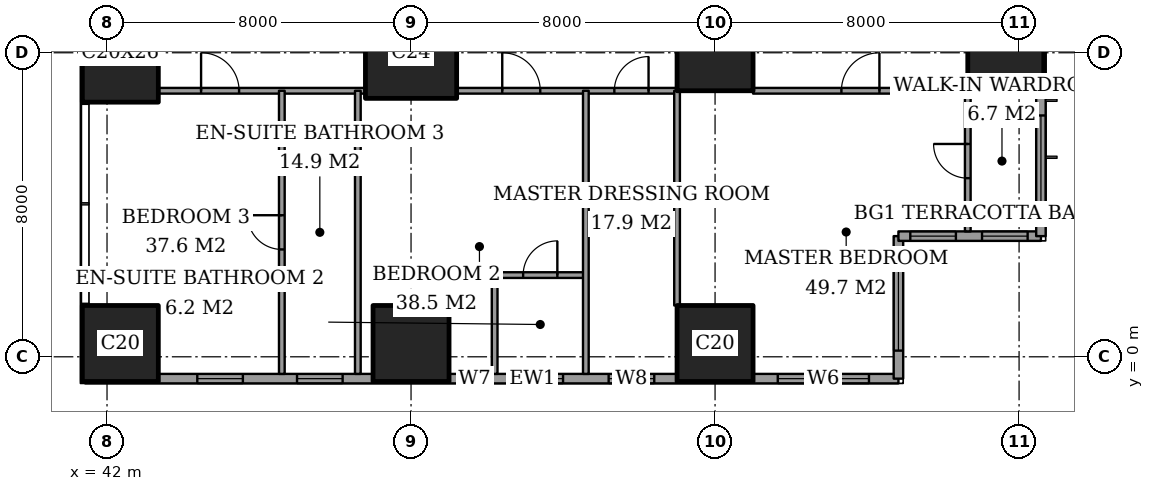
"""IFC4 building model, lengths in metres.
Left out: names, types, materials, properties, quantities, classifications, styles, units other than length and angle.
Written with IfcOpenShell. Run it as: python <this file> out.ifc"""

import sys

from ifc_helpers import new_model, si_unit, direction, frame, frame_2d, origin, origin_2d, place, context, subcontext, project, spatial, rectangle, extrude, element, fill, save


model = new_model("IFC4")
c1 = context("Model", 3, precision=1e-05, world=origin(), true_north=direction((0.0, 1.0)))
c2 = subcontext(c1, "Body", "Model", "MODEL_VIEW")
j1 = project(units=[si_unit("LENGTHUNIT", "METRE"), si_unit("PLANEANGLEUNIT", "RADIAN")], contexts=[c1])
p1 = place(None, origin())
s1 = spatial("IfcSite", under=j1, at=p1, CompositionType="ELEMENT")
p2 = place(p1, origin())
s2 = spatial("IfcBuilding", under=s1, at=p2, CompositionType="ELEMENT")
p3 = place(p2, frame((0.0, 0.0, 76.4)))
s3 = spatial("IfcBuildingStorey", under=s2, at=p3, CompositionType="ELEMENT", Elevation=76.4)
p4 = place(p3, frame((42.35, 0.35, 0.0), z_axis=(0.0, 0.0, 1.0), x_axis=(1.0, 0.0, 0.0)))
e1 = element("IfcColumn", 1, at=p4, inside=s3, PredefinedType="COLUMN", context=c2, shape_type="SweptSolid", body=[
    extrude(rectangle(XDim=2.0, YDim=2.0, at=origin_2d()), origin(), (0.0, 0.0, 1.0), 3.6),
])
p5 = place(p3, frame((42.35, 8.0, 0.0), z_axis=(0.0, 0.0, 1.0), x_axis=(1.0, 0.0, 0.0)))
e2 = element("IfcColumn", 2, at=p5, inside=s3, PredefinedType="COLUMN", context=c2, shape_type="SweptSolid", body=[
    extrude(rectangle(XDim=2.0, YDim=2.6, at=origin_2d()), origin(), (0.0, 0.0, 1.0), 3.6),
])
p6 = place(p3, frame((50.0, 0.35, 0.0), z_axis=(0.0, 0.0, 1.0), x_axis=(1.0, 0.0, 0.0)))
e3 = element("IfcColumn", 3, at=p6, inside=s3, PredefinedType="COLUMN", context=c2, shape_type="SweptSolid", body=[
    extrude(rectangle(XDim=2.0, YDim=2.0, at=origin_2d()), origin(), (0.0, 0.0, 1.0), 3.6),
])
p7 = place(p3, frame((50.0, 8.0, 0.0), z_axis=(0.0, 0.0, 1.0), x_axis=(1.0, 0.0, 0.0)))
e4 = element("IfcColumn", 4, at=p7, inside=s3, PredefinedType="COLUMN", context=c2, shape_type="SweptSolid", body=[
    extrude(rectangle(XDim=2.4, YDim=2.4, at=origin_2d()), origin(), (0.0, 0.0, 1.0), 3.6),
])
for number, where, z_axis, x_axis in (
    (5, (58.0, 0.35, 0.0), (0.0, 0.0, 1.0), (1.0, 0.0, 0.0)),
    (6, (58.0, 8.0, 0.0), (0.0, 0.0, 1.0), (1.0, 0.0, 0.0)),
    (7, (65.65, 8.0, 0.0), (0.0, 0.0, 1.0), (1.0, 0.0, 0.0)),
):
    element("IfcColumn", number, at=place(p3, frame(where, z_axis=z_axis, x_axis=x_axis)), inside=s3, PredefinedType="COLUMN", context=c2, shape_type="SweptSolid", body=[
        extrude(rectangle(XDim=2.0, YDim=2.0, at=origin_2d()), origin(), (0.0, 0.0, 1.0), 3.6),
    ])
p8 = place(p3, frame((41.425, -0.575, 0.0), z_axis=(0.0, 0.0, 1.0), x_axis=(1.0, 0.0, 0.0)))
e8 = element("IfcWall", 8, at=p8, inside=s3, PredefinedType="SOLIDWALL", context=c2, shape_type="SweptSolid", body=[
    extrude(rectangle(XDim=21.4, YDim=0.25, at=frame_2d((10.7, 0.0))), origin(), (0.0, 0.0, 1.0), 3.6),
])
p9 = place(p8, frame((2.95, 0.0, 0.6)))
e9 = element("IfcOpeningElement", 9, at=p9, cuts=e8, PredefinedType="OPENING", context=c2, shape_type="SweptSolid", body=[
    extrude(rectangle(XDim=1.2, YDim=2.0, at=frame_2d((0.6, 1.0))), frame((0.0, 0.135, 0.0), z_axis=(0.0, -1.0, 0.0), x_axis=(1.0, 0.0, 0.0)), (0.0, 0.0, 1.0), 0.27),
])
p10 = place(p8, frame((5.575, 0.0, 0.6)))
e10 = element("IfcOpeningElement", 10, at=p10, cuts=e8, PredefinedType="OPENING", context=c2, shape_type="SweptSolid", body=[
    extrude(rectangle(XDim=1.2, YDim=2.0, at=frame_2d((0.6, 1.0))), frame((0.0, 0.135, 0.0), z_axis=(0.0, -1.0, 0.0), x_axis=(1.0, 0.0, 0.0)), (0.0, 0.0, 1.0), 0.27),
])
p11 = place(p8, frame((9.95, 0.0, 0.6)))
e11 = element("IfcOpeningElement", 11, at=p11, cuts=e8, PredefinedType="OPENING", context=c2, shape_type="SweptSolid", body=[
    extrude(rectangle(XDim=0.6, YDim=2.0, at=frame_2d((0.3, 1.0))), frame((0.0, 0.135, 0.0), z_axis=(0.0, -1.0, 0.0), x_axis=(1.0, 0.0, 0.0)), (0.0, 0.0, 1.0), 0.27),
])
p12 = place(p8, frame((11.375, 0.0, 0.6)))
e12 = element("IfcOpeningElement", 12, at=p12, cuts=e8, PredefinedType="OPENING", context=c2, shape_type="SweptSolid", body=[
    extrude(rectangle(XDim=1.2, YDim=2.0, at=frame_2d((0.6, 1.0))), frame((0.0, 0.135, 0.0), z_axis=(0.0, -1.0, 0.0), x_axis=(1.0, 0.0, 0.0)), (0.0, 0.0, 1.0), 0.27),
])
p13 = place(p8, frame((13.775, 0.0, 0.6)))
e13 = element("IfcOpeningElement", 13, at=p13, cuts=e8, PredefinedType="OPENING", context=c2, shape_type="SweptSolid", body=[
    extrude(rectangle(XDim=1.2, YDim=2.0, at=frame_2d((0.6, 1.0))), frame((0.0, 0.135, 0.0), z_axis=(0.0, -1.0, 0.0), x_axis=(1.0, 0.0, 0.0)), (0.0, 0.0, 1.0), 0.27),
])
p14 = place(p8, frame((18.225, 0.0, 0.6)))
e14 = element("IfcOpeningElement", 14, at=p14, cuts=e8, PredefinedType="OPENING", context=c2, shape_type="SweptSolid", body=[
    extrude(rectangle(XDim=2.4, YDim=2.0, at=frame_2d((1.2, 1.0))), frame((0.0, 0.135, 0.0), z_axis=(0.0, -1.0, 0.0), x_axis=(1.0, 0.0, 0.0)), (0.0, 0.0, 1.0), 0.27),
])
p15 = place(p3, frame((62.825, -0.575, 0.0), z_axis=(0.0, 0.0, 1.0), x_axis=(0.0, 1.0, 0.0)))
e15 = element("IfcWall", 15, at=p15, inside=s3, PredefinedType="SOLIDWALL", context=c2, shape_type="SweptSolid", body=[
    extrude(rectangle(XDim=3.75, YDim=0.25, at=frame_2d((1.875, 0.0))), origin(), (0.0, 0.0, 1.0), 3.6),
])
p16 = place(p15, frame((0.738, 0.0, 0.6)))
e16 = element("IfcOpeningElement", 16, at=p16, cuts=e15, PredefinedType="OPENING", context=c2, shape_type="SweptSolid", body=[
    extrude(rectangle(XDim=2.4, YDim=2.0, at=frame_2d((1.2, 1.0))), frame((0.0, 0.135, 0.0), z_axis=(0.0, -1.0, 0.0), x_axis=(1.0, 0.0, 0.0)), (0.0, 0.0, 1.0), 0.27),
])
p17 = place(p3, frame((62.825, 3.175, 0.0), z_axis=(0.0, 0.0, 1.0), x_axis=(1.0, 0.0, 0.0)))
e17 = element("IfcWall", 17, at=p17, inside=s3, PredefinedType="SOLIDWALL", context=c2, shape_type="SweptSolid", body=[
    extrude(rectangle(XDim=3.75, YDim=0.25, at=frame_2d((1.875, 0.0))), origin(), (0.0, 0.0, 1.0), 3.6),
])
p18 = place(p17, frame((0.312, 0.0, 0.6)))
e18 = element("IfcOpeningElement", 18, at=p18, cuts=e17, PredefinedType="OPENING", context=c2, shape_type="SweptSolid", body=[
    extrude(rectangle(XDim=1.2, YDim=2.0, at=frame_2d((0.6, 1.0))), frame((0.0, 0.135, 0.0), z_axis=(0.0, -1.0, 0.0), x_axis=(1.0, 0.0, 0.0)), (0.0, 0.0, 1.0), 0.27),
])
p19 = place(p17, frame((2.2, 0.0, 0.6)))
e19 = element("IfcOpeningElement", 19, at=p19, cuts=e17, PredefinedType="OPENING", context=c2, shape_type="SweptSolid", body=[
    extrude(rectangle(XDim=1.2, YDim=2.0, at=frame_2d((0.6, 1.0))), frame((0.0, 0.135, 0.0), z_axis=(0.0, -1.0, 0.0), x_axis=(1.0, 0.0, 0.0)), (0.0, 0.0, 1.0), 0.27),
])
p20 = place(p3, frame((66.575, 3.175, 0.0), z_axis=(0.0, 0.0, 1.0), x_axis=(0.0, 1.0, 0.0)))
e20 = element("IfcWall", 20, at=p20, inside=s3, PredefinedType="SOLIDWALL", context=c2, shape_type="SweptSolid", body=[
    extrude(rectangle(XDim=41.65, YDim=0.25, at=frame_2d((20.825, 0.0))), origin(), (0.0, 0.0, 1.0), 3.6),
])
p21 = place(p20, frame((0.775, 0.0, 0.6)))
e21 = element("IfcOpeningElement", 21, at=p21, cuts=e20, PredefinedType="OPENING", context=c2, shape_type="SweptSolid", body=[
    extrude(rectangle(XDim=2.4, YDim=2.0, at=frame_2d((1.2, 1.0))), frame((0.0, 0.135, 0.0), z_axis=(0.0, -1.0, 0.0), x_axis=(1.0, 0.0, 0.0)), (0.0, 0.0, 1.0), 0.27),
])
p22 = place(p20, frame((6.1, 0.0, 0.6)))
e22 = element("IfcOpeningElement", 22, at=p22, cuts=e20, PredefinedType="OPENING", context=c2, shape_type="SweptSolid", body=[
    extrude(rectangle(XDim=1.2, YDim=2.0, at=frame_2d((0.6, 1.0))), frame((0.0, 0.135, 0.0), z_axis=(0.0, -1.0, 0.0), x_axis=(1.0, 0.0, 0.0)), (0.0, 0.0, 1.0), 0.27),
])
p23 = place(p20, frame((8.275, 0.0, 0.6)))
e23 = element("IfcOpeningElement", 23, at=p23, cuts=e20, PredefinedType="OPENING", context=c2, shape_type="SweptSolid", body=[
    extrude(rectangle(XDim=2.4, YDim=2.0, at=frame_2d((1.2, 1.0))), frame((0.0, 0.135, 0.0), z_axis=(0.0, -1.0, 0.0), x_axis=(1.0, 0.0, 0.0)), (0.0, 0.0, 1.0), 0.27),
])
p24 = place(p20, frame((15.775, 0.0, 0.6)))
e24 = element("IfcOpeningElement", 24, at=p24, cuts=e20, PredefinedType="OPENING", context=c2, shape_type="SweptSolid", body=[
    extrude(rectangle(XDim=2.4, YDim=2.0, at=frame_2d((1.2, 1.0))), frame((0.0, 0.135, 0.0), z_axis=(0.0, -1.0, 0.0), x_axis=(1.0, 0.0, 0.0)), (0.0, 0.0, 1.0), 0.27),
])
p25 = place(p20, frame((23.475, 0.0, 0.6)))
e25 = element("IfcOpeningElement", 25, at=p25, cuts=e20, PredefinedType="OPENING", context=c2, shape_type="SweptSolid", body=[
    extrude(rectangle(XDim=2.4, YDim=2.0, at=frame_2d((1.2, 1.0))), frame((0.0, 0.135, 0.0), z_axis=(0.0, -1.0, 0.0), x_axis=(1.0, 0.0, 0.0)), (0.0, 0.0, 1.0), 0.27),
])
p26 = place(p20, frame((30.975, 0.0, 0.6)))
e26 = element("IfcOpeningElement", 26, at=p26, cuts=e20, PredefinedType="OPENING", context=c2, shape_type="SweptSolid", body=[
    extrude(rectangle(XDim=2.4, YDim=2.0, at=frame_2d((1.2, 1.0))), frame((0.0, 0.135, 0.0), z_axis=(0.0, -1.0, 0.0), x_axis=(1.0, 0.0, 0.0)), (0.0, 0.0, 1.0), 0.27),
])
p27 = place(p20, frame((34.5, 0.0, 0.6)))
e27 = element("IfcOpeningElement", 27, at=p27, cuts=e20, PredefinedType="OPENING", context=c2, shape_type="SweptSolid", body=[
    extrude(rectangle(XDim=1.2, YDim=2.0, at=frame_2d((0.6, 1.0))), frame((0.0, 0.135, 0.0), z_axis=(0.0, -1.0, 0.0), x_axis=(1.0, 0.0, 0.0)), (0.0, 0.0, 1.0), 0.27),
])
p28 = place(p20, frame((38.475, 0.0, 0.6)))
e28 = element("IfcOpeningElement", 28, at=p28, cuts=e20, PredefinedType="OPENING", context=c2, shape_type="SweptSolid", body=[
    extrude(rectangle(XDim=2.4, YDim=2.0, at=frame_2d((1.2, 1.0))), frame((0.0, 0.135, 0.0), z_axis=(0.0, -1.0, 0.0), x_axis=(1.0, 0.0, 0.0)), (0.0, 0.0, 1.0), 0.27),
])
p29 = place(p3, frame((52.2, 2.15, 0.0), z_axis=(0.0, 0.0, 1.0), x_axis=(1.0, 0.0, 0.0)))
e29 = element("IfcWall", 29, at=p29, inside=s3, PredefinedType="PARTITIONING", context=c2, shape_type="SweptSolid", body=[
    extrude(rectangle(XDim=2.4, YDim=0.15, at=frame_2d((1.2, 0.0))), origin(), (0.0, 0.0, 1.0), 3.35),
])
p30 = place(p29, frame((0.75, 0.0, 0.0)))
e30 = element("IfcOpeningElement", 30, at=p30, cuts=e29, PredefinedType="OPENING", context=c2, shape_type="SweptSolid", body=[
    extrude(rectangle(XDim=0.9, YDim=2.1, at=frame_2d((0.45, 1.05))), frame((0.0, 0.085, 0.0), z_axis=(0.0, -1.0, 0.0), x_axis=(1.0, 0.0, 0.0)), (0.0, 0.0, 1.0), 0.17),
])
p31 = place(p3, frame((43.35, 7.0, 0.0), z_axis=(0.0, 0.0, 1.0), x_axis=(1.0, 0.0, 0.0)))
e31 = element("IfcWall", 31, at=p31, inside=s3, PredefinedType="PARTITIONING", context=c2, shape_type="SweptSolid", body=[
    extrude(rectangle(XDim=5.45, YDim=0.15, at=frame_2d((2.725, 0.0))), origin(), (0.0, 0.0, 1.0), 3.35),
])
p32 = place(p31, frame((1.125, 0.0, 0.0)))
e32 = element("IfcOpeningElement", 32, at=p32, cuts=e31, PredefinedType="OPENING", context=c2, shape_type="SweptSolid", body=[
    extrude(rectangle(XDim=1.0, YDim=2.1, at=frame_2d((0.5, 1.05))), frame((0.0, 0.085, 0.0), z_axis=(0.0, -1.0, 0.0), x_axis=(1.0, 0.0, 0.0)), (0.0, 0.0, 1.0), 0.17),
])
p33 = place(p3, frame((51.2, 7.0, 0.0), z_axis=(0.0, 0.0, 1.0), x_axis=(1.0, 0.0, 0.0)))
e33 = element("IfcWall", 33, at=p33, inside=s3, PredefinedType="PARTITIONING", context=c2, shape_type="SweptSolid", body=[
    extrude(rectangle(XDim=5.8, YDim=0.15, at=frame_2d((2.9, 0.0))), origin(), (0.0, 0.0, 1.0), 3.35),
])
p34 = place(p33, frame((4.15, 0.0, 0.0)))
e34 = element("IfcOpeningElement", 34, at=p34, cuts=e33, PredefinedType="OPENING", context=c2, shape_type="SweptSolid", body=[
    extrude(rectangle(XDim=0.9, YDim=2.1, at=frame_2d((0.45, 1.05))), frame((0.0, 0.085, 0.0), z_axis=(0.0, -1.0, 0.0), x_axis=(1.0, 0.0, 0.0)), (0.0, 0.0, 1.0), 0.17),
])
p35 = place(p33, frame((1.2, 0.0, 0.0)))
e35 = element("IfcOpeningElement", 35, at=p35, cuts=e33, PredefinedType="OPENING", context=c2, shape_type="SweptSolid", body=[
    extrude(rectangle(XDim=1.0, YDim=2.1, at=frame_2d((0.5, 1.05))), frame((0.0, 0.085, 0.0), z_axis=(0.0, -1.0, 0.0), x_axis=(1.0, 0.0, 0.0)), (0.0, 0.0, 1.0), 0.17),
])
p36 = place(p3, frame((59.0, 7.0, 0.0), z_axis=(0.0, 0.0, 1.0), x_axis=(1.0, 0.0, 0.0)))
e36 = element("IfcWall", 36, at=p36, inside=s3, PredefinedType="PARTITIONING", context=c2, shape_type="SweptSolid", body=[
    extrude(rectangle(XDim=5.65, YDim=0.15, at=frame_2d((2.825, 0.0))), origin(), (0.0, 0.0, 1.0), 3.35),
])
p37 = place(p36, frame((2.325, 0.0, 0.0)))
e37 = element("IfcOpeningElement", 37, at=p37, cuts=e36, PredefinedType="OPENING", context=c2, shape_type="SweptSolid", body=[
    extrude(rectangle(XDim=1.0, YDim=2.1, at=frame_2d((0.5, 1.05))), frame((0.0, 0.085, 0.0), z_axis=(0.0, -1.0, 0.0), x_axis=(1.0, 0.0, 0.0)), (0.0, 0.0, 1.0), 0.17),
])
p38 = place(p3, frame((46.6, -0.45, 0.0), z_axis=(0.0, 0.0, 1.0), x_axis=(0.0, 1.0, 0.0)))
e38 = element("IfcWall", 38, at=p38, inside=s3, PredefinedType="PARTITIONING", context=c2, shape_type="SweptSolid", body=[
    extrude(rectangle(XDim=7.45, YDim=0.15, at=frame_2d((3.725, 0.0))), origin(), (0.0, 0.0, 1.0), 3.35),
])
p39 = place(p38, frame((3.275, 0.0, 0.0)))
e39 = element("IfcOpeningElement", 39, at=p39, cuts=e38, PredefinedType="OPENING", context=c2, shape_type="SweptSolid", body=[
    extrude(rectangle(XDim=0.9, YDim=2.1, at=frame_2d((0.45, 1.05))), frame((0.0, 0.085, 0.0), z_axis=(0.0, -1.0, 0.0), x_axis=(1.0, 0.0, 0.0)), (0.0, 0.0, 1.0), 0.17),
])
p40 = place(p3, frame((48.6, -0.45, 0.0), z_axis=(0.0, 0.0, 1.0), x_axis=(0.0, 1.0, 0.0)))
e40 = element("IfcWall", 40, at=p40, inside=s3, PredefinedType="PARTITIONING", context=c2, shape_type="SweptSolid", body=[
    extrude(rectangle(XDim=7.45, YDim=0.15, at=frame_2d((3.725, 0.0))), origin(), (0.0, 0.0, 1.0), 3.35),
])
p41 = place(p3, frame((52.2, -0.45, 0.0), z_axis=(0.0, 0.0, 1.0), x_axis=(0.0, 1.0, 0.0)))
e41 = element("IfcWall", 41, at=p41, inside=s3, PredefinedType="PARTITIONING", context=c2, shape_type="SweptSolid", body=[
    extrude(rectangle(XDim=2.6, YDim=0.15, at=frame_2d((1.3, 0.0))), origin(), (0.0, 0.0, 1.0), 3.35),
])
p42 = place(p3, frame((54.6, -0.45, 0.0), z_axis=(0.0, 0.0, 1.0), x_axis=(0.0, 1.0, 0.0)))
e42 = element("IfcWall", 42, at=p42, inside=s3, PredefinedType="PARTITIONING", context=c2, shape_type="SweptSolid", body=[
    extrude(rectangle(XDim=7.45, YDim=0.15, at=frame_2d((3.725, 0.0))), origin(), (0.0, 0.0, 1.0), 3.35),
])
p43 = place(p3, frame((57.0, 1.35, 0.0), z_axis=(0.0, 0.0, 1.0), x_axis=(0.0, 1.0, 0.0)))
e43 = element("IfcWall", 43, at=p43, inside=s3, PredefinedType="PARTITIONING", context=c2, shape_type="SweptSolid", body=[
    extrude(rectangle(XDim=5.65, YDim=0.15, at=frame_2d((2.825, 0.0))), origin(), (0.0, 0.0, 1.0), 3.35),
])
p44 = place(p3, frame((64.65, 3.3, 0.0), z_axis=(0.0, 0.0, 1.0), x_axis=(0.0, 1.0, 0.0)))
e44 = element("IfcWall", 44, at=p44, inside=s3, PredefinedType="PARTITIONING", context=c2, shape_type="SweptSolid", body=[
    extrude(rectangle(XDim=3.7, YDim=0.15, at=frame_2d((1.85, 0.0))), origin(), (0.0, 0.0, 1.0), 3.35),
])
p45 = place(p44, frame((1.4, 0.0, 0.0)))
e45 = element("IfcOpeningElement", 45, at=p45, cuts=e44, PredefinedType="OPENING", context=c2, shape_type="SweptSolid", body=[
    extrude(rectangle(XDim=0.9, YDim=2.1, at=frame_2d((0.45, 1.05))), frame((0.0, 0.085, 0.0), z_axis=(0.0, -1.0, 0.0), x_axis=(1.0, 0.0, 0.0)), (0.0, 0.0, 1.0), 0.17),
])
p46 = place(p9, origin())
e46 = element("IfcWindow", 46, at=p46, inside=s3, PartitioningType="SINGLE_PANEL", PredefinedType="WINDOW", context=c2, shape_type="SweptSolid", body=[
    extrude(rectangle(XDim=1.2, YDim=2.0, at=frame_2d((0.6, 1.0))), frame((0.0, 0.03, 0.0), z_axis=(0.0, -1.0, 0.0), x_axis=(1.0, 0.0, 0.0)), (0.0, 0.0, 1.0), 0.06),
])
fill(e9, e46)
p47 = place(p10, origin())
e47 = element("IfcWindow", 47, at=p47, inside=s3, PartitioningType="SINGLE_PANEL", PredefinedType="WINDOW", context=c2, shape_type="SweptSolid", body=[
    extrude(rectangle(XDim=1.2, YDim=2.0, at=frame_2d((0.6, 1.0))), frame((0.0, 0.03, 0.0), z_axis=(0.0, -1.0, 0.0), x_axis=(1.0, 0.0, 0.0)), (0.0, 0.0, 1.0), 0.06),
])
fill(e10, e47)
p48 = place(p11, origin())
e48 = element("IfcWindow", 48, at=p48, inside=s3, PartitioningType="SINGLE_PANEL", PredefinedType="WINDOW", context=c2, shape_type="SweptSolid", body=[
    extrude(rectangle(XDim=0.6, YDim=2.0, at=frame_2d((0.3, 1.0))), frame((0.0, 0.03, 0.0), z_axis=(0.0, -1.0, 0.0), x_axis=(1.0, 0.0, 0.0)), (0.0, 0.0, 1.0), 0.06),
])
fill(e11, e48)
p49 = place(p12, origin())
e49 = element("IfcWindow", 49, at=p49, inside=s3, PartitioningType="SINGLE_PANEL", PredefinedType="WINDOW", context=c2, shape_type="SweptSolid", body=[
    extrude(rectangle(XDim=1.2, YDim=2.0, at=frame_2d((0.6, 1.0))), frame((0.0, 0.03, 0.0), z_axis=(0.0, -1.0, 0.0), x_axis=(1.0, 0.0, 0.0)), (0.0, 0.0, 1.0), 0.06),
])
fill(e12, e49)
p50 = place(p13, origin())
e50 = element("IfcWindow", 50, at=p50, inside=s3, PartitioningType="SINGLE_PANEL", PredefinedType="WINDOW", context=c2, shape_type="SweptSolid", body=[
    extrude(rectangle(XDim=1.2, YDim=2.0, at=frame_2d((0.6, 1.0))), frame((0.0, 0.03, 0.0), z_axis=(0.0, -1.0, 0.0), x_axis=(1.0, 0.0, 0.0)), (0.0, 0.0, 1.0), 0.06),
])
fill(e13, e50)
p51 = place(p14, origin())
e51 = element("IfcWindow", 51, at=p51, inside=s3, PartitioningType="SINGLE_PANEL", PredefinedType="WINDOW", context=c2, shape_type="SweptSolid", body=[
    extrude(rectangle(XDim=2.4, YDim=2.0, at=frame_2d((1.2, 1.0))), frame((0.0, 0.03, 0.0), z_axis=(0.0, -1.0, 0.0), x_axis=(1.0, 0.0, 0.0)), (0.0, 0.0, 1.0), 0.06),
])
fill(e14, e51)
p52 = place(p16, origin())
e52 = element("IfcWindow", 52, at=p52, inside=s3, PartitioningType="SINGLE_PANEL", PredefinedType="WINDOW", context=c2, shape_type="SweptSolid", body=[
    extrude(rectangle(XDim=2.4, YDim=2.0, at=frame_2d((1.2, 1.0))), frame((0.0, 0.03, 0.0), z_axis=(0.0, -1.0, 0.0), x_axis=(1.0, 0.0, 0.0)), (0.0, 0.0, 1.0), 0.06),
])
fill(e16, e52)
p53 = place(p18, origin())
e53 = element("IfcWindow", 53, at=p53, inside=s3, PartitioningType="SINGLE_PANEL", PredefinedType="WINDOW", context=c2, shape_type="SweptSolid", body=[
    extrude(rectangle(XDim=1.2, YDim=2.0, at=frame_2d((0.6, 1.0))), frame((0.0, 0.03, 0.0), z_axis=(0.0, -1.0, 0.0), x_axis=(1.0, 0.0, 0.0)), (0.0, 0.0, 1.0), 0.06),
])
fill(e18, e53)
p54 = place(p19, origin())
e54 = element("IfcWindow", 54, at=p54, inside=s3, PartitioningType="SINGLE_PANEL", PredefinedType="WINDOW", context=c2, shape_type="SweptSolid", body=[
    extrude(rectangle(XDim=1.2, YDim=2.0, at=frame_2d((0.6, 1.0))), frame((0.0, 0.03, 0.0), z_axis=(0.0, -1.0, 0.0), x_axis=(1.0, 0.0, 0.0)), (0.0, 0.0, 1.0), 0.06),
])
fill(e19, e54)
p55 = place(p21, origin())
e55 = element("IfcWindow", 55, at=p55, inside=s3, PartitioningType="SINGLE_PANEL", PredefinedType="WINDOW", context=c2, shape_type="SweptSolid", body=[
    extrude(rectangle(XDim=2.4, YDim=2.0, at=frame_2d((1.2, 1.0))), frame((0.0, 0.03, 0.0), z_axis=(0.0, -1.0, 0.0), x_axis=(1.0, 0.0, 0.0)), (0.0, 0.0, 1.0), 0.06),
])
fill(e21, e55)
p56 = place(p45, origin())
e56 = element("IfcDoor", 56, at=p56, inside=s3, OperationType="SINGLE_SWING_LEFT", PredefinedType="DOOR", context=c2, shape_type="SweptSolid", body=[
    extrude(rectangle(XDim=0.9, YDim=2.1, at=frame_2d((0.45, 1.05))), frame((0.0, 0.025, 0.0), z_axis=(0.0, -1.0, 0.0), x_axis=(1.0, 0.0, 0.0)), (0.0, 0.0, 1.0), 0.05),
])
fill(e45, e56)
p57 = place(p37, origin())
e57 = element("IfcDoor", 57, at=p57, inside=s3, OperationType="SINGLE_SWING_LEFT", PredefinedType="DOOR", context=c2, shape_type="SweptSolid", body=[
    extrude(rectangle(XDim=1.0, YDim=2.1, at=frame_2d((0.5, 1.05))), frame((0.0, 0.025, 0.0), z_axis=(0.0, -1.0, 0.0), x_axis=(1.0, 0.0, 0.0)), (0.0, 0.0, 1.0), 0.05),
])
fill(e37, e57)
p58 = place(p34, origin())
e58 = element("IfcDoor", 58, at=p58, inside=s3, OperationType="SINGLE_SWING_LEFT", PredefinedType="DOOR", context=c2, shape_type="SweptSolid", body=[
    extrude(rectangle(XDim=0.9, YDim=2.1, at=frame_2d((0.45, 1.05))), frame((0.0, 0.025, 0.0), z_axis=(0.0, -1.0, 0.0), x_axis=(1.0, 0.0, 0.0)), (0.0, 0.0, 1.0), 0.05),
])
fill(e34, e58)
p59 = place(p30, origin())
e59 = element("IfcDoor", 59, at=p59, inside=s3, OperationType="SINGLE_SWING_LEFT", PredefinedType="DOOR", context=c2, shape_type="SweptSolid", body=[
    extrude(rectangle(XDim=0.9, YDim=2.1, at=frame_2d((0.45, 1.05))), frame((0.0, 0.025, 0.0), z_axis=(0.0, -1.0, 0.0), x_axis=(1.0, 0.0, 0.0)), (0.0, 0.0, 1.0), 0.05),
])
fill(e30, e59)
p60 = place(p35, origin())
e60 = element("IfcDoor", 60, at=p60, inside=s3, OperationType="SINGLE_SWING_RIGHT", PredefinedType="DOOR", context=c2, shape_type="SweptSolid", body=[
    extrude(rectangle(XDim=1.0, YDim=2.1, at=frame_2d((0.5, 1.05))), frame((0.0, 0.025, 0.0), z_axis=(0.0, -1.0, 0.0), x_axis=(1.0, 0.0, 0.0)), (0.0, 0.0, 1.0), 0.05),
])
fill(e35, e60)
p61 = place(p39, origin())
e61 = element("IfcDoor", 61, at=p61, inside=s3, OperationType="SINGLE_SWING_LEFT", PredefinedType="DOOR", context=c2, shape_type="SweptSolid", body=[
    extrude(rectangle(XDim=0.9, YDim=2.1, at=frame_2d((0.45, 1.05))), frame((0.0, 0.025, 0.0), z_axis=(0.0, -1.0, 0.0), x_axis=(1.0, 0.0, 0.0)), (0.0, 0.0, 1.0), 0.05),
])
fill(e39, e61)
p62 = place(p32, origin())
e62 = element("IfcDoor", 62, at=p62, inside=s3, OperationType="SINGLE_SWING_RIGHT", PredefinedType="DOOR", context=c2, shape_type="SweptSolid", body=[
    extrude(rectangle(XDim=1.0, YDim=2.1, at=frame_2d((0.5, 1.05))), frame((0.0, 0.025, 0.0), z_axis=(0.0, -1.0, 0.0), x_axis=(1.0, 0.0, 0.0)), (0.0, 0.0, 1.0), 0.05),
])
fill(e32, e62)
save(model, sys.argv[1])
